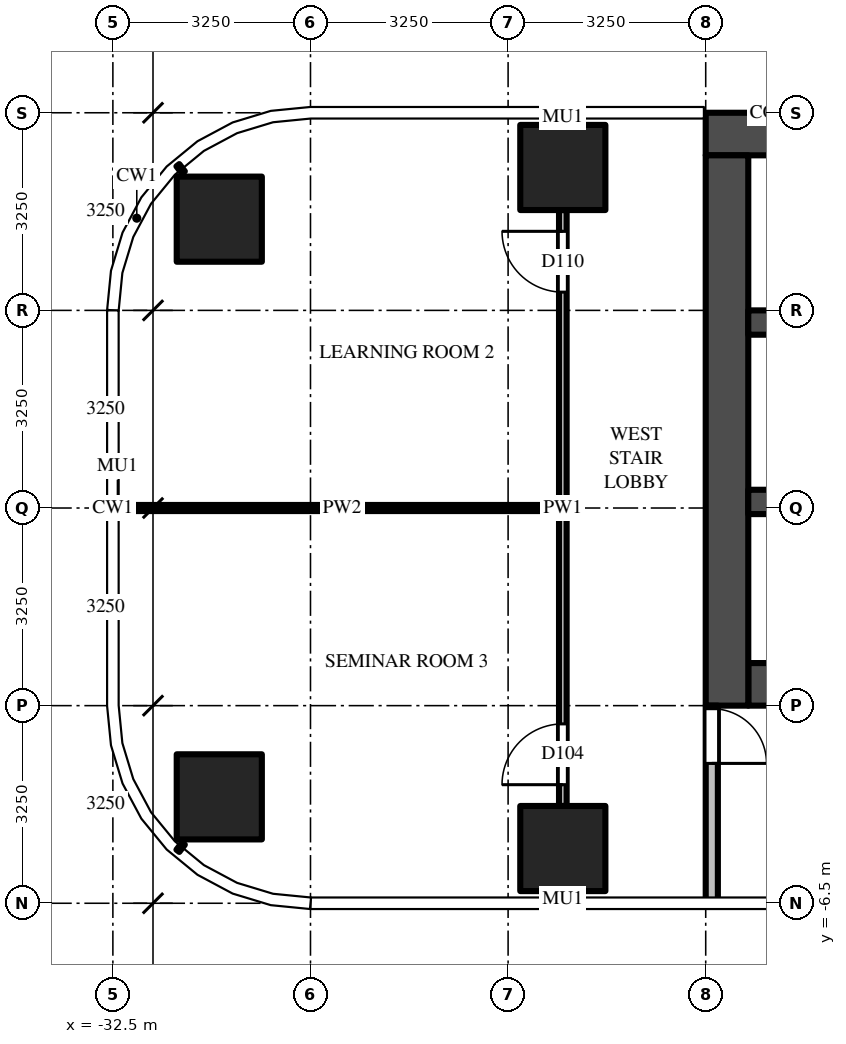
"""IFC4 building model, lengths in metres.
Left out: names, types, materials, properties, quantities, classifications, styles, units other than length and angle.
Written with IfcOpenShell. Run it as: python <this file> out.ifc"""

import sys

from ifc_helpers import new_model, si_unit, direction, frame, frame_2d, origin, origin_2d, place, context, subcontext, project, spatial, polyline, rectangle, outline, extrude, source, transform, mapped, element, fill, save


model = new_model("IFC4")
c1 = context("Model", 3, precision=1e-05, world=origin(), true_north=direction((0.0, 1.0)))
c2 = subcontext(c1, "Body", "Model", "MODEL_VIEW")
j1 = project(units=[si_unit("LENGTHUNIT", "METRE"), si_unit("PLANEANGLEUNIT", "RADIAN")], contexts=[c1])
p1 = place(None, origin())
s1 = spatial("IfcSite", under=j1, at=p1, CompositionType="ELEMENT")
p2 = place(p1, origin())
s2 = spatial("IfcBuilding", under=s1, at=p2, CompositionType="ELEMENT")
p3 = place(p2, frame((0.0, 0.0, 70.0)))
s3 = spatial("IfcBuildingStorey", under=s2, at=p3, CompositionType="ELEMENT", Elevation=70.0)
m1 = source(origin(), c2, "Body", "SweptSolid", [
    extrude(rectangle(XDim=1.4, YDim=1.4, at=origin_2d()), origin(), (0.0, 0.0, 1.0), 4.5),
])
for number, where, z_axis, x_axis in (
    (1, (-25.1, -5.6, 0.0), (0.0, 0.0, 1.0), (1.0, 0.0, 0.0)),
    (2, (-30.75, -4.75, 0.0), (0.0, 0.0, 1.0), (1.0, 0.0, 0.0)),
    (3, (-25.1, 5.6, 0.0), (0.0, 0.0, 1.0), (1.0, 0.0, 0.0)),
    (4, (-30.75, 4.75, 0.0), (0.0, 0.0, 1.0), (1.0, 0.0, 0.0)),
):
    element("IfcColumn", number, at=place(p3, frame(where, z_axis=z_axis, x_axis=x_axis)), inside=s3, PredefinedType="COLUMN", context=c2, shape_type="MappedRepresentation", body=[
        mapped(m1, transform((0.0, 0.0, 0.0))),
    ])
m2 = source(origin(), c2, "Body", "SweptSolid", [
    extrude(rectangle(XDim=16.45, YDim=0.7, at=frame_2d((8.225, 0.0))), origin(), (0.0, 0.0, 1.0), 4.25),
])
p4 = place(p3, frame((-6.3, 6.15, 0.0), z_axis=(0.0, 0.0, 1.0), x_axis=(-1.0, 0.0, 0.0)))
e5 = element("IfcWall", 5, at=p4, inside=s3, PredefinedType="SHEAR", context=c2, shape_type="MappedRepresentation", body=[
    mapped(m2, transform((0.0, 0.0, 0.0))),
])
m3 = source(origin(), c2, "Body", "SweptSolid", [
    extrude(rectangle(XDim=14.85, YDim=0.7, at=frame_2d((7.425, 0.0))), origin(), (0.0, 0.0, 1.0), 4.25),
])
p5 = place(p3, frame((-7.2, -2.9, 0.0), z_axis=(0.0, 0.0, 1.0), x_axis=(-1.0, 0.0, 0.0)))
e6 = element("IfcWall", 6, at=p5, inside=s3, PredefinedType="SHEAR", context=c2, shape_type="MappedRepresentation", body=[
    mapped(m3, transform((0.0, 0.0, 0.0))),
])
m4 = source(origin(), c2, "Body", "SweptSolid", [
    extrude(rectangle(XDim=1.3, YDim=2.1, at=frame_2d((0.65, 1.05))), frame((0.0, 0.36, 0.0), z_axis=(0.0, -1.0, 0.0), x_axis=(1.0, 0.0, 0.0)), (0.0, 0.0, 1.0), 0.72),
])
p6 = place(p5, frame((12.2, 0.0, 0.0)))
e7 = element("IfcOpeningElement", 7, at=p6, cuts=e6, PredefinedType="OPENING", context=c2, shape_type="MappedRepresentation", body=[
    mapped(m4, transform((0.0, 0.0, 0.0))),
])
m5 = source(origin(), c2, "Body", "SweptSolid", [
    extrude(rectangle(XDim=1.2, YDim=2.1, at=frame_2d((0.6, 1.05))), frame((0.0, 0.36, 0.0), z_axis=(0.0, -1.0, 0.0), x_axis=(1.0, 0.0, 0.0)), (0.0, 0.0, 1.0), 0.72),
])
p7 = place(p5, frame((9.85, 0.0, 0.0)))
e8 = element("IfcOpeningElement", 8, at=p7, cuts=e6, PredefinedType="OPENING", context=c2, shape_type="MappedRepresentation", body=[
    mapped(m5, transform((0.0, 0.0, 0.0))),
])
m6 = source(origin(), c2, "Body", "SweptSolid", [
    extrude(rectangle(XDim=1.0, YDim=2.1, at=frame_2d((0.5, 1.05))), frame((0.0, 0.36, 0.0), z_axis=(0.0, -1.0, 0.0), x_axis=(1.0, 0.0, 0.0)), (0.0, 0.0, 1.0), 0.72),
])
p8 = place(p5, frame((7.9, 0.0, 0.0)))
e9 = element("IfcOpeningElement", 9, at=p8, cuts=e6, PredefinedType="OPENING", context=c2, shape_type="MappedRepresentation", body=[
    mapped(m6, transform((0.0, 0.0, 0.0))),
])
m7 = source(origin(), c2, "Body", "SweptSolid", [
    extrude(rectangle(XDim=0.9, YDim=2.1, at=frame_2d((0.45, 1.05))), frame((0.0, 0.36, 0.0), z_axis=(0.0, -1.0, 0.0), x_axis=(1.0, 0.0, 0.0)), (0.0, 0.0, 1.0), 0.72),
])
p9 = place(p5, frame((0.65, 0.0, 0.0)))
e10 = element("IfcOpeningElement", 10, at=p9, cuts=e6, PredefinedType="OPENING", context=c2, shape_type="MappedRepresentation", body=[
    mapped(m7, transform((0.0, 0.0, 0.0))),
])
p10 = place(p5, frame((3.2, 0.0, 0.0)))
e11 = element("IfcOpeningElement", 11, at=p10, cuts=e6, PredefinedType="OPENING", context=c2, shape_type="MappedRepresentation", body=[
    mapped(m6, transform((0.0, 0.0, 0.0))),
])
p11 = place(p5, frame((5.85, 0.0, 0.0)))
e12 = element("IfcOpeningElement", 12, at=p11, cuts=e6, PredefinedType="OPENING", context=c2, shape_type="MappedRepresentation", body=[
    mapped(m7, transform((0.0, 0.0, 0.0))),
])
m8 = source(origin(), c2, "Body", "SweptSolid", [
    extrude(rectangle(XDim=9.05, YDim=0.7, at=frame_2d((4.525, 0.0))), origin(), (0.0, 0.0, 1.0), 4.25),
])
p12 = place(p3, frame((-22.4, 5.8, 0.0), z_axis=(0.0, 0.0, 1.0), x_axis=(0.0, -1.0, 0.0)))
e13 = element("IfcWall", 13, at=p12, inside=s3, PredefinedType="SHEAR", context=c2, shape_type="MappedRepresentation", body=[
    mapped(m8, transform((0.0, 0.0, 0.0))),
])
m9 = source(origin(), c2, "Body", "SweptSolid", [
    extrude(rectangle(XDim=14.85, YDim=0.4, at=frame_2d((7.425, 0.0))), origin(), (0.0, 0.0, 1.0), 4.25),
])
p13 = place(p3, frame((-7.2, 0.1, 0.0), z_axis=(0.0, 0.0, 1.0), x_axis=(-1.0, 0.0, 0.0)))
e14 = element("IfcWall", 14, at=p13, inside=s3, PredefinedType="SHEAR", context=c2, shape_type="MappedRepresentation", body=[
    mapped(m9, transform((0.0, 0.0, 0.0))),
])
m10 = source(origin(), c2, "Body", "SweptSolid", [
    extrude(rectangle(XDim=1.0, YDim=2.1, at=frame_2d((0.5, 1.05))), frame((0.0, 0.21, 0.0), z_axis=(0.0, -1.0, 0.0), x_axis=(1.0, 0.0, 0.0)), (0.0, 0.0, 1.0), 0.42),
])
p14 = place(p13, frame((7.9, 0.0, 0.0)))
e15 = element("IfcOpeningElement", 15, at=p14, cuts=e14, PredefinedType="OPENING", context=c2, shape_type="MappedRepresentation", body=[
    mapped(m10, transform((0.0, 0.0, 0.0))),
])
m11 = source(origin(), c2, "Body", "SweptSolid", [
    extrude(rectangle(XDim=5.7, YDim=0.4, at=frame_2d((2.85, 0.0))), origin(), (0.0, 0.0, 1.0), 4.25),
])
p15 = place(p3, frame((-16.35, 3.05, 0.0), z_axis=(0.0, 0.0, 1.0), x_axis=(-1.0, 0.0, 0.0)))
e16 = element("IfcWall", 16, at=p15, inside=s3, PredefinedType="SHEAR", context=c2, shape_type="MappedRepresentation", body=[
    mapped(m11, transform((0.0, 0.0, 0.0))),
])
m12 = source(origin(), c2, "Body", "SweptSolid", [
    extrude(rectangle(XDim=3.25, YDim=0.2, at=frame_2d((1.625, 0.0))), origin(), (0.0, 0.0, 1.0), 4.25),
])
p16 = place(p3, frame((-22.65, -3.25, 0.0), z_axis=(0.0, 0.0, 1.0), x_axis=(0.0, -1.0, 0.0)))
e17 = element("IfcWall", 17, at=p16, inside=s3, PredefinedType="PARTITIONING", context=c2, shape_type="MappedRepresentation", body=[
    mapped(m12, transform((0.0, 0.0, 0.0))),
])
m13 = source(origin(), c2, "Body", "SweptSolid", [
    extrude(rectangle(XDim=0.9, YDim=2.1, at=frame_2d((0.45, 1.05))), frame((0.0, 0.11, 0.0), z_axis=(0.0, -1.0, 0.0), x_axis=(1.0, 0.0, 0.0)), (0.0, 0.0, 1.0), 0.22),
])
p17 = place(p16, frame((0.05, 0.0, 0.0)))
e18 = element("IfcOpeningElement", 18, at=p17, cuts=e17, PredefinedType="OPENING", context=c2, shape_type="MappedRepresentation", body=[
    mapped(m13, transform((0.0, 0.0, 0.0))),
])
p18 = place(p3, origin())
e19 = element("IfcWall", 19, at=p18, inside=s3, PredefinedType="USERDEFINED", context=c2, shape_type="SweptSolid", body=[
    extrude(outline(polyline([(-29.014, -8.26), (-28.873, -8.685), (-28.935, -8.705), (-30.221, -8.763), (-31.853, -8.207), (-32.659, -7.467), (-32.253, -7.025), (-31.54, -7.68), (-30.135, -8.159), (-29.003, -8.108), (-28.996, -8.257), (-29.014, -8.26)])), origin(), (0.0, 0.0, 1.0), 0.5),
])
m14 = source(origin(), c2, "Body", "SweptSolid", [
    extrude(rectangle(XDim=9.8, YDim=0.125, at=frame_2d((4.9, 0.0))), origin(), (0.0, 0.0, 1.0), 3.468),
])
p19 = place(p3, frame((-25.1, -4.9, 0.0), z_axis=(0.0, 0.0, 1.0), x_axis=(0.0, 1.0, 0.0)))
e20 = element("IfcWall", 20, at=p19, inside=s3, PredefinedType="PARTITIONING", context=c2, shape_type="MappedRepresentation", body=[
    mapped(m14, transform((0.0, 0.0, 0.0))),
])
m15 = source(origin(), c2, "Body", "SweptSolid", [
    extrude(rectangle(XDim=1.0, YDim=2.1, at=frame_2d((0.5, 1.05))), frame((0.0, 0.073, 0.0), z_axis=(0.0, -1.0, 0.0), x_axis=(1.0, 0.0, 0.0)), (0.0, 0.0, 1.0), 0.145),
])
p20 = place(p19, frame((0.35, 0.0, 0.0)))
e21 = element("IfcOpeningElement", 21, at=p20, cuts=e20, PredefinedType="OPENING", context=c2, shape_type="MappedRepresentation", body=[
    mapped(m15, transform((0.0, 0.0, 0.0))),
])
p21 = place(p19, frame((8.45, 0.0, 0.0)))
e22 = element("IfcOpeningElement", 22, at=p21, cuts=e20, PredefinedType="OPENING", context=c2, shape_type="MappedRepresentation", body=[
    mapped(m15, transform((0.0, 0.0, 0.0))),
])
m16 = source(origin(), c2, "Body", "SweptSolid", [
    extrude(rectangle(XDim=7.137, YDim=0.1, at=frame_2d((3.569, 0.0))), origin(), (0.0, 0.0, 1.0), 3.33),
])
p22 = place(p3, frame((-32.3, 0.0, 0.0), z_axis=(0.0, 0.0, 1.0), x_axis=(1.0, 0.0, 0.0)))
e23 = element("IfcWall", 23, at=p22, inside=s3, PredefinedType="PARTITIONING", context=c2, shape_type="MappedRepresentation", body=[
    mapped(m16, transform((0.0, 0.0, 0.0))),
])
m17 = source(origin(), c2, "Body", "SweptSolid", [
    extrude(rectangle(XDim=0.9, YDim=2.1, at=frame_2d((0.45, 1.05))), frame((0.0, 0.025, 0.0), z_axis=(0.0, -1.0, 0.0), x_axis=(1.0, 0.0, 0.0)), (0.0, 0.0, 1.0), 0.05),
])
p23 = place(p17, origin())
e24 = element("IfcDoor", 24, at=p23, inside=s3, OperationType="SINGLE_SWING_RIGHT", PredefinedType="DOOR", context=c2, shape_type="MappedRepresentation", body=[
    mapped(m17, transform((0.0, 0.0, 0.0))),
])
fill(e18, e24)
m18 = source(origin(), c2, "Body", "SweptSolid", [
    extrude(rectangle(XDim=1.0, YDim=2.1, at=frame_2d((0.5, 1.05))), frame((0.0, 0.025, 0.0), z_axis=(0.0, -1.0, 0.0), x_axis=(1.0, 0.0, 0.0)), (0.0, 0.0, 1.0), 0.05),
])
p24 = place(p20, origin())
e25 = element("IfcDoor", 25, at=p24, inside=s3, OperationType="SINGLE_SWING_LEFT", PredefinedType="DOOR", context=c2, shape_type="MappedRepresentation", body=[
    mapped(m18, transform((0.0, 0.0, 0.0))),
])
fill(e21, e25)
p25 = place(p21, origin())
e26 = element("IfcDoor", 26, at=p25, inside=s3, OperationType="SINGLE_SWING_RIGHT", PredefinedType="DOOR", context=c2, shape_type="MappedRepresentation", body=[
    mapped(m18, transform((0.0, 0.0, 0.0))),
])
fill(e22, e26)
save(model, sys.argv[1])
